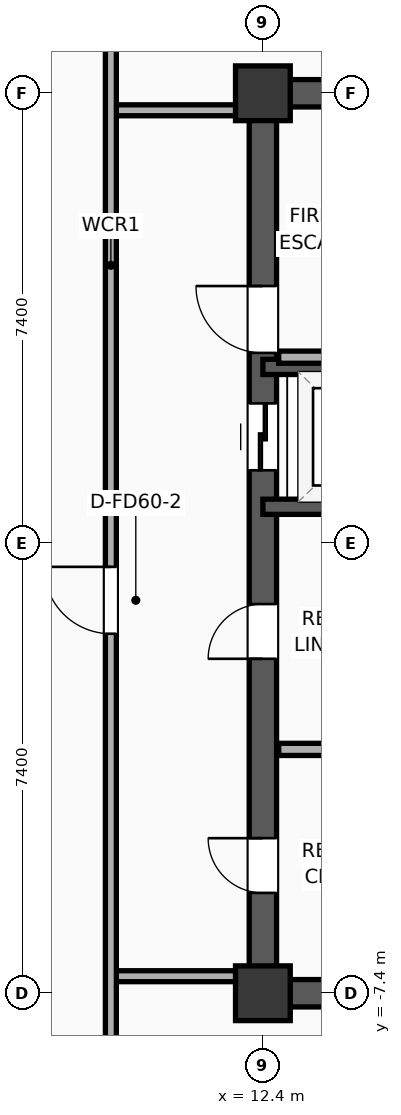
"""IFC4 building model, lengths in metres.
Left out: names, types, materials, properties, quantities, classifications, styles, units other than length and angle.
Written with IfcOpenShell. Run it as: python <this file> out.ifc"""

import sys

from ifc_helpers import new_model, si_unit, direction, frame, frame_2d, origin, origin_2d, place, context, subcontext, project, spatial, rectangle, extrude, element, fill, save


model = new_model("IFC4")
c1 = context("Model", 3, precision=1e-05, world=origin(), true_north=direction((0.0, 1.0)))
c2 = subcontext(c1, "Body", "Model", "MODEL_VIEW")
j1 = project(units=[si_unit("LENGTHUNIT", "METRE"), si_unit("PLANEANGLEUNIT", "RADIAN")], contexts=[c1])
p1 = place(None, origin())
s1 = spatial("IfcSite", under=j1, at=p1, CompositionType="ELEMENT")
p2 = place(p1, origin())
s2 = spatial("IfcBuilding", under=s1, at=p2, CompositionType="ELEMENT")
p3 = place(p2, frame((0.0, 0.0, 243.1)))
s3 = spatial("IfcBuildingStorey", under=s2, at=p3, CompositionType="ELEMENT", Elevation=243.1)
for number, where, z_axis, x_axis in (
    (1, (12.4, -7.4, 0.0), (0.0, 0.0, 1.0), (1.0, 0.0, 0.0)),
    (2, (12.4, 7.4, 0.0), (0.0, 0.0, 1.0), (1.0, 0.0, 0.0)),
):
    element("IfcColumn", number, at=place(p3, frame(where, z_axis=z_axis, x_axis=x_axis)), inside=s3, PredefinedType="COLUMN", context=c2, shape_type="SweptSolid", body=[
        extrude(rectangle(XDim=0.9, YDim=0.9, at=origin_2d()), origin(), (0.0, 0.0, 1.0), 3.9),
    ])
for number, where, z_axis, x_axis in (
    (3, (12.175, -7.4, 0.0), (0.0, 0.0, 1.0), (1.0, 0.0, 0.0)),
    (4, (12.175, 7.4, 0.0), (0.0, 0.0, 1.0), (1.0, 0.0, 0.0)),
):
    element("IfcWall", number, at=place(p3, frame(where, z_axis=z_axis, x_axis=x_axis)), inside=s3, PredefinedType="SHEAR", context=c2, shape_type="SweptSolid", body=[
        extrude(rectangle(XDim=7.25, YDim=0.45, at=frame_2d((3.625, 0.0))), origin(), (0.0, 0.0, 1.0), 3.65),
    ])
p4 = place(p3, frame((12.4, -7.4, 0.0), z_axis=(0.0, 0.0, 1.0), x_axis=(0.0, 1.0, 0.0)))
e5 = element("IfcWall", 5, at=p4, inside=s3, PredefinedType="SHEAR", context=c2, shape_type="SweptSolid", body=[
    extrude(rectangle(XDim=14.8, YDim=0.45, at=frame_2d((7.4, 0.0))), origin(), (0.0, 0.0, 1.0), 3.65),
])
p5 = place(p4, frame((8.6, 0.0, 0.0)))
e6 = element("IfcOpeningElement", 6, at=p5, cuts=e5, PredefinedType="OPENING", context=c2, shape_type="SweptSolid", body=[
    extrude(rectangle(XDim=1.1, YDim=2.05, at=frame_2d((0.55, 1.025))), frame((0.0, 0.235, 0.0), z_axis=(0.0, -1.0, 0.0), x_axis=(1.0, 0.0, 0.0)), (0.0, 0.0, 1.0), 0.47),
])
p6 = place(p4, frame((10.53, 0.0, 0.0)))
e7 = element("IfcOpeningElement", 7, at=p6, cuts=e5, PredefinedType="OPENING", context=c2, shape_type="SweptSolid", body=[
    extrude(rectangle(XDim=1.1, YDim=2.05, at=frame_2d((0.55, 1.025))), frame((0.0, 0.235, 0.0), z_axis=(0.0, -1.0, 0.0), x_axis=(1.0, 0.0, 0.0)), (0.0, 0.0, 1.0), 0.47),
])
p7 = place(p4, frame((1.65, 0.0, 0.0)))
e8 = element("IfcOpeningElement", 8, at=p7, cuts=e5, PredefinedType="OPENING", context=c2, shape_type="SweptSolid", body=[
    extrude(rectangle(XDim=0.9, YDim=2.05, at=frame_2d((0.45, 1.025))), frame((0.0, 0.235, 0.0), z_axis=(0.0, -1.0, 0.0), x_axis=(1.0, 0.0, 0.0)), (0.0, 0.0, 1.0), 0.47),
])
p8 = place(p4, frame((5.5, 0.0, 0.0)))
e9 = element("IfcOpeningElement", 9, at=p8, cuts=e5, PredefinedType="OPENING", context=c2, shape_type="SweptSolid", body=[
    extrude(rectangle(XDim=0.9, YDim=2.05, at=frame_2d((0.45, 1.025))), frame((0.0, 0.235, 0.0), z_axis=(0.0, -1.0, 0.0), x_axis=(1.0, 0.0, 0.0)), (0.0, 0.0, 1.0), 0.47),
])
for number, where, z_axis, x_axis in (
    (10, (12.4, 0.6, 0.0), (0.0, 0.0, 1.0), (1.0, 0.0, 0.0)),
    (11, (15.4, 2.9, 0.0), (0.0, 0.0, 1.0), (-1.0, 0.0, 0.0)),
):
    element("IfcWall", number, at=place(p3, frame(where, z_axis=z_axis, x_axis=x_axis)), inside=s3, PredefinedType="SOLIDWALL", context=c2, shape_type="SweptSolid", body=[
        extrude(rectangle(XDim=3.0, YDim=0.25, at=frame_2d((1.5, 0.0))), origin(), (0.0, 0.0, 1.0), 3.65),
    ])
p9 = place(p3, frame((12.66, 3.06, 0.0), z_axis=(0.0, 0.0, 1.0), x_axis=(1.0, 0.0, 0.0)))
e12 = element("IfcWall", 12, at=p9, inside=s3, PredefinedType="PARTITIONING", context=c2, shape_type="SweptSolid", body=[
    extrude(rectangle(XDim=3.16, YDim=0.2, at=frame_2d((1.58, 0.0))), origin(), (0.0, 0.0, 1.0), 3.65),
])
p10 = place(p3, frame((12.66, -3.39, 0.0), z_axis=(0.0, 0.0, 1.0), x_axis=(1.0, 0.0, 0.0)))
e13 = element("IfcWall", 13, at=p10, inside=s3, PredefinedType="PARTITIONING", context=c2, shape_type="SweptSolid", body=[
    extrude(rectangle(XDim=2.94, YDim=0.2, at=frame_2d((1.47, 0.0))), origin(), (0.0, 0.0, 1.0), 3.65),
])
for number, where, z_axis, x_axis in (
    (14, (9.88, 7.12, 0.0), (0.0, 0.0, 1.0), (1.0, 0.0, 0.0)),
    (15, (9.88, -7.12, 0.0), (0.0, 0.0, 1.0), (1.0, 0.0, 0.0)),
):
    element("IfcWall", number, at=place(p3, frame(where, z_axis=z_axis, x_axis=x_axis)), inside=s3, PredefinedType="PARTITIONING", context=c2, shape_type="SweptSolid", body=[
        extrude(rectangle(XDim=2.27, YDim=0.18, at=frame_2d((1.135, 0.0))), origin(), (0.0, 0.0, 1.0), 3.65),
    ])
p11 = place(p3, frame((9.9, -9.38, 0.0), z_axis=(0.0, 0.0, 1.0), x_axis=(0.0, 1.0, 0.0)))
e16 = element("IfcWall", 16, at=p11, inside=s3, PredefinedType="PARTITIONING", context=c2, shape_type="SweptSolid", body=[
    extrude(rectangle(XDim=18.76, YDim=0.18, at=frame_2d((9.38, 0.0))), origin(), (0.0, 0.0, 1.0), 3.65),
])
p12 = place(p11, frame((7.892, 0.0, 0.0)))
e17 = element("IfcOpeningElement", 17, at=p12, cuts=e16, PredefinedType="OPENING", context=c2, shape_type="SweptSolid", body=[
    extrude(rectangle(XDim=1.1, YDim=2.05, at=frame_2d((0.55, 1.025))), frame((0.0, 0.1, 0.0), z_axis=(0.0, -1.0, 0.0), x_axis=(1.0, 0.0, 0.0)), (0.0, 0.0, 1.0), 0.2),
])
p13 = place(p5, origin())
e18 = element("IfcDoor", 18, at=p13, inside=s3, OperationType="SLIDING_TO_LEFT", PredefinedType="DOOR", context=c2, shape_type="SweptSolid", body=[
    extrude(rectangle(XDim=1.1, YDim=2.05, at=frame_2d((0.55, 1.025))), frame((0.0, 0.025, 0.0), z_axis=(0.0, -1.0, 0.0), x_axis=(1.0, 0.0, 0.0)), (0.0, 0.0, 1.0), 0.05),
])
fill(e6, e18)
p14 = place(p12, origin())
e19 = element("IfcDoor", 19, at=p14, inside=s3, OperationType="SINGLE_SWING_RIGHT", PredefinedType="DOOR", context=c2, shape_type="SweptSolid", body=[
    extrude(rectangle(XDim=1.1, YDim=2.05, at=frame_2d((0.55, 1.025))), frame((0.0, 0.025, 0.0), z_axis=(0.0, -1.0, 0.0), x_axis=(1.0, 0.0, 0.0)), (0.0, 0.0, 1.0), 0.05),
])
fill(e17, e19)
p15 = place(p6, origin())
e20 = element("IfcDoor", 20, at=p15, inside=s3, OperationType="SINGLE_SWING_RIGHT", PredefinedType="DOOR", context=c2, shape_type="SweptSolid", body=[
    extrude(rectangle(XDim=1.1, YDim=2.05, at=frame_2d((0.55, 1.025))), frame((0.0, 0.025, 0.0), z_axis=(0.0, -1.0, 0.0), x_axis=(1.0, 0.0, 0.0)), (0.0, 0.0, 1.0), 0.05),
])
fill(e7, e20)
p16 = place(p7, origin())
e21 = element("IfcDoor", 21, at=p16, inside=s3, OperationType="SINGLE_SWING_RIGHT", PredefinedType="DOOR", context=c2, shape_type="SweptSolid", body=[
    extrude(rectangle(XDim=0.9, YDim=2.05, at=frame_2d((0.45, 1.025))), frame((0.0, 0.025, 0.0), z_axis=(0.0, -1.0, 0.0), x_axis=(1.0, 0.0, 0.0)), (0.0, 0.0, 1.0), 0.05),
])
fill(e8, e21)
p17 = place(p8, origin())
e22 = element("IfcDoor", 22, at=p17, inside=s3, OperationType="SINGLE_SWING_LEFT", PredefinedType="DOOR", context=c2, shape_type="SweptSolid", body=[
    extrude(rectangle(XDim=0.9, YDim=2.05, at=frame_2d((0.45, 1.025))), frame((0.0, 0.025, 0.0), z_axis=(0.0, -1.0, 0.0), x_axis=(1.0, 0.0, 0.0)), (0.0, 0.0, 1.0), 0.05),
])
fill(e9, e22)
save(model, sys.argv[1])
